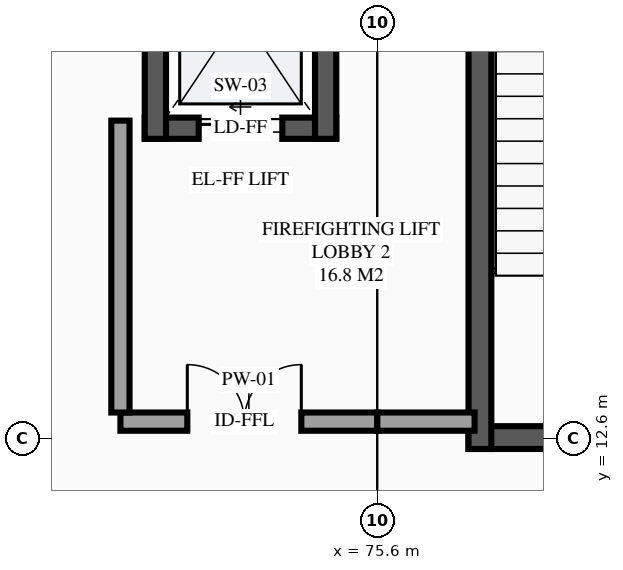
"""IFC4 building model, lengths in metres.
Left out: names, types, materials, properties, quantities, classifications, styles, units other than length and angle.
Written with IfcOpenShell. Run it as: python <this file> out.ifc"""

import sys

from ifc_helpers import new_model, si_unit, direction, frame, frame_2d, origin, place, context, subcontext, project, spatial, rectangle, extrude, element, fill, save


model = new_model("IFC4")
c1 = context("Model", 3, precision=1e-05, world=origin(), true_north=direction((0.0, 1.0)))
c2 = subcontext(c1, "Body", "Model", "MODEL_VIEW")
j1 = project(units=[si_unit("LENGTHUNIT", "METRE"), si_unit("PLANEANGLEUNIT", "RADIAN")], contexts=[c1])
p1 = place(None, origin())
s1 = spatial("IfcSite", under=j1, at=p1, CompositionType="ELEMENT")
p2 = place(p1, origin())
s2 = spatial("IfcBuilding", under=s1, at=p2, CompositionType="ELEMENT")
p3 = place(p2, frame((0.0, 0.0, 14.1)))
s3 = spatial("IfcBuildingStorey", under=s2, at=p3, CompositionType="ELEMENT", Elevation=14.1)
p4 = place(p3, frame((72.54, 16.68, 0.0), z_axis=(0.0, 0.0, 1.0), x_axis=(1.0, 0.0, 0.0)))
e1 = element("IfcWall", 1, at=p4, inside=s3, PredefinedType="SHEAR", context=c2, shape_type="SweptSolid", body=[
    extrude(rectangle(XDim=2.52, YDim=0.28, at=frame_2d((1.26, 0.0))), origin(), (0.0, 0.0, 1.0), 4.2),
])
p5 = place(p4, frame((0.71, 0.0, 0.0)))
e2 = element("IfcOpeningElement", 2, at=p5, cuts=e1, PredefinedType="OPENING", context=c2, shape_type="SweptSolid", body=[
    extrude(rectangle(XDim=1.1, YDim=2.2, at=frame_2d((0.55, 1.1))), frame((0.0, 0.15, 0.0), z_axis=(0.0, -1.0, 0.0), x_axis=(1.0, 0.0, 0.0)), (0.0, 0.0, 1.0), 0.3),
])
for number, where, z_axis, x_axis in (
    (3, (74.92, 16.54, 0.0), (0.0, 0.0, 1.0), (0.0, 1.0, 0.0)),
    (4, (72.68, 19.86, 0.0), (0.0, 0.0, 1.0), (0.0, -1.0, 0.0)),
):
    element("IfcWall", number, at=place(p3, frame(where, z_axis=z_axis, x_axis=x_axis)), inside=s3, PredefinedType="SHEAR", context=c2, shape_type="SweptSolid", body=[
        extrude(rectangle(XDim=3.32, YDim=0.28, at=frame_2d((1.66, 0.0))), origin(), (0.0, 0.0, 1.0), 4.2),
    ])
p6 = place(p3, frame((76.8, 12.61, 0.0), z_axis=(0.0, 0.0, 1.0), x_axis=(1.0, 0.0, 0.0)))
e5 = element("IfcWall", 5, at=p6, inside=s3, PredefinedType="SHEAR", context=c2, shape_type="SweptSolid", body=[
    extrude(rectangle(XDim=5.2, YDim=0.3, at=frame_2d((2.6, 0.0))), origin(), (0.0, 0.0, 1.0), 4.2),
])
p7 = place(p6, frame((2.025, 0.0, 0.0)))
e6 = element("IfcOpeningElement", 6, at=p7, cuts=e5, PredefinedType="OPENING", context=c2, shape_type="SweptSolid", body=[
    extrude(rectangle(XDim=1.15, YDim=2.15, at=frame_2d((0.575, 1.075))), frame((0.0, 0.16, 0.0), z_axis=(0.0, -1.0, 0.0), x_axis=(1.0, 0.0, 0.0)), (0.0, 0.0, 1.0), 0.32),
])
p8 = place(p3, frame((76.95, 21.3, 0.0), z_axis=(0.0, 0.0, 1.0), x_axis=(0.0, -1.0, 0.0)))
e7 = element("IfcWall", 7, at=p8, inside=s3, PredefinedType="SHEAR", context=c2, shape_type="SweptSolid", body=[
    extrude(rectangle(XDim=8.84, YDim=0.3, at=frame_2d((4.42, 0.0))), origin(), (0.0, 0.0, 1.0), 4.2),
])
p9 = place(p3, frame((72.22, 12.82, 0.0), z_axis=(0.0, 0.0, 1.0), x_axis=(1.0, 0.0, 0.0)))
e8 = element("IfcWall", 8, at=p9, inside=s3, PredefinedType="PARTITIONING", context=c2, shape_type="SweptSolid", body=[
    extrude(rectangle(XDim=3.38, YDim=0.24, at=frame_2d((1.69, 0.0))), origin(), (0.0, 0.0, 1.0), 2.95),
])
p10 = place(p9, frame((0.88, 0.0, 0.0)))
e9 = element("IfcOpeningElement", 9, at=p10, cuts=e8, PredefinedType="OPENING", context=c2, shape_type="SweptSolid", body=[
    extrude(rectangle(XDim=1.5, YDim=2.15, at=frame_2d((0.75, 1.075))), frame((0.0, 0.13, 0.0), z_axis=(0.0, -1.0, 0.0), x_axis=(1.0, 0.0, 0.0)), (0.0, 0.0, 1.0), 0.26),
])
p11 = place(p3, frame((72.22, 12.94, 0.0), z_axis=(0.0, 0.0, 1.0), x_axis=(0.0, 1.0, 0.0)))
e10 = element("IfcWall", 10, at=p11, inside=s3, PredefinedType="PARTITIONING", context=c2, shape_type="SweptSolid", body=[
    extrude(rectangle(XDim=3.84, YDim=0.24, at=frame_2d((1.92, 0.0))), origin(), (0.0, 0.0, 1.0), 3.895),
])
p12 = place(p3, frame((75.6, 12.82, 0.0), z_axis=(0.0, 0.0, 1.0), x_axis=(1.0, 0.0, 0.0)))
e11 = element("IfcWall", 11, at=p12, inside=s3, PredefinedType="PARTITIONING", context=c2, shape_type="SweptSolid", body=[
    extrude(rectangle(XDim=1.28, YDim=0.24, at=frame_2d((0.64, 0.0))), origin(), (0.0, 0.0, 1.0), 3.05),
])
p13 = place(p5, origin())
e12 = element("IfcDoor", 12, at=p13, inside=s3, OperationType="SLIDING_TO_LEFT", PredefinedType="DOOR", context=c2, shape_type="SweptSolid", body=[
    extrude(rectangle(XDim=1.1, YDim=2.2, at=frame_2d((0.55, 1.1))), frame((0.0, 0.025, 0.0), z_axis=(0.0, -1.0, 0.0), x_axis=(1.0, 0.0, 0.0)), (0.0, 0.0, 1.0), 0.05),
])
fill(e2, e12)
p14 = place(p10, origin())
e13 = element("IfcDoor", 13, at=p14, inside=s3, OperationType="DOUBLE_DOOR_SINGLE_SWING", PredefinedType="DOOR", context=c2, shape_type="SweptSolid", body=[
    extrude(rectangle(XDim=1.5, YDim=2.15, at=frame_2d((0.75, 1.075))), frame((0.0, 0.025, 0.0), z_axis=(0.0, -1.0, 0.0), x_axis=(1.0, 0.0, 0.0)), (0.0, 0.0, 1.0), 0.05),
])
fill(e9, e13)
save(model, sys.argv[1])
